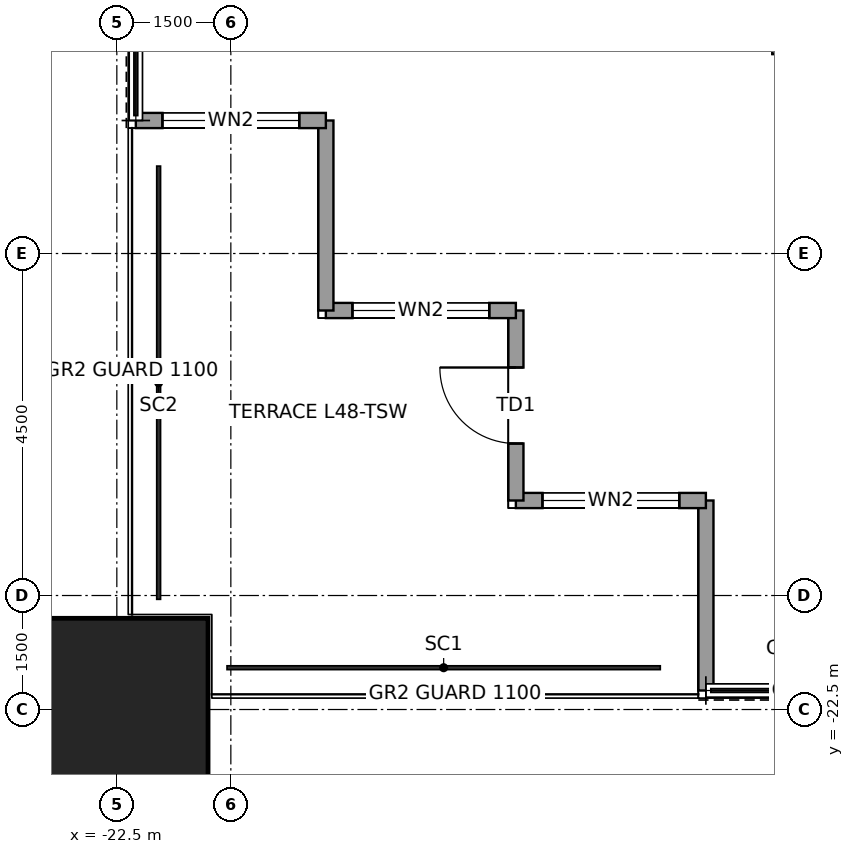
"""IFC4 building model, lengths in metres.
Left out: names, types, materials, properties, quantities, classifications, styles, units other than length and angle.
Written with IfcOpenShell. Run it as: python <this file> out.ifc"""

import sys

from ifc_helpers import new_model, si_unit, direction, frame, frame_2d, origin, origin_2d, place, context, subcontext, project, spatial, rectangle, hollow_rectangle, extrude, element, fill, save


model = new_model("IFC4")
c1 = context("Model", 3, precision=1e-05, world=origin(), true_north=direction((0.0, 1.0)))
c2 = subcontext(c1, "Body", "Model", "MODEL_VIEW")
j1 = project(units=[si_unit("LENGTHUNIT", "METRE"), si_unit("PLANEANGLEUNIT", "RADIAN")], contexts=[c1])
p1 = place(None, origin())
s1 = spatial("IfcSite", under=j1, at=p1, CompositionType="ELEMENT")
p2 = place(p1, origin())
s2 = spatial("IfcBuilding", under=s1, at=p2, CompositionType="ELEMENT")
p3 = place(p2, frame((0.0, 0.0, 225.9)))
s3 = spatial("IfcBuildingStorey", under=s2, at=p3, CompositionType="ELEMENT", Elevation=225.9)
p4 = place(p3, frame((-22.5, -22.5, 0.0), z_axis=(0.0, 0.0, 1.0), x_axis=(1.0, 0.0, 0.0)))
e1 = element("IfcColumn", 1, at=p4, inside=s3, PredefinedType="COLUMN", context=c2, shape_type="SweptSolid", body=[
    extrude(hollow_rectangle(XDim=2.4, YDim=2.4, WallThickness=0.12, at=origin_2d()), origin(), (0.0, 0.0, 1.0), 4.0),
])
p5 = place(p3, frame((-14.75, -22.25, 0.0), z_axis=(0.0, 0.0, 1.0), x_axis=(0.0, 1.0, 0.0)))
e2 = element("IfcWall", 2, at=p5, inside=s3, PredefinedType="SOLIDWALL", context=c2, shape_type="SweptSolid", body=[
    extrude(rectangle(XDim=2.5, YDim=0.2, at=frame_2d((1.25, 0.0))), origin(), (0.0, 0.0, 1.0), 3.85),
])
p6 = place(p3, frame((-14.75, -19.75, 0.0), z_axis=(0.0, 0.0, 1.0), x_axis=(-1.0, 0.0, 0.0)))
e3 = element("IfcWall", 3, at=p6, inside=s3, PredefinedType="SOLIDWALL", context=c2, shape_type="SweptSolid", body=[
    extrude(rectangle(XDim=2.5, YDim=0.2, at=frame_2d((1.25, 0.0))), origin(), (0.0, 0.0, 1.0), 3.85),
])
p7 = place(p6, frame((0.35, 0.0, 0.3)))
e4 = element("IfcOpeningElement", 4, at=p7, cuts=e3, PredefinedType="OPENING", context=c2, shape_type="SweptSolid", body=[
    extrude(rectangle(XDim=1.8, YDim=2.4, at=frame_2d((0.9, 1.2))), frame((0.0, 0.11, 0.0), z_axis=(0.0, -1.0, 0.0), x_axis=(1.0, 0.0, 0.0)), (0.0, 0.0, 1.0), 0.22),
])
p8 = place(p3, frame((-17.25, -19.75, 0.0), z_axis=(0.0, 0.0, 1.0), x_axis=(0.0, 1.0, 0.0)))
e5 = element("IfcWall", 5, at=p8, inside=s3, PredefinedType="SOLIDWALL", context=c2, shape_type="SweptSolid", body=[
    extrude(rectangle(XDim=2.5, YDim=0.2, at=frame_2d((1.25, 0.0))), origin(), (0.0, 0.0, 1.0), 3.85),
])
p9 = place(p8, frame((0.75, 0.0, 0.0)))
e6 = element("IfcOpeningElement", 6, at=p9, cuts=e5, PredefinedType="OPENING", context=c2, shape_type="SweptSolid", body=[
    extrude(rectangle(XDim=1.0, YDim=2.4, at=frame_2d((0.5, 1.2))), frame((0.0, 0.11, 0.0), z_axis=(0.0, -1.0, 0.0), x_axis=(1.0, 0.0, 0.0)), (0.0, 0.0, 1.0), 0.22),
])
p10 = place(p3, frame((-17.25, -17.25, 0.0), z_axis=(0.0, 0.0, 1.0), x_axis=(-1.0, 0.0, 0.0)))
e7 = element("IfcWall", 7, at=p10, inside=s3, PredefinedType="SOLIDWALL", context=c2, shape_type="SweptSolid", body=[
    extrude(rectangle(XDim=2.5, YDim=0.2, at=frame_2d((1.25, 0.0))), origin(), (0.0, 0.0, 1.0), 3.85),
])
p11 = place(p10, frame((0.35, 0.0, 0.3)))
e8 = element("IfcOpeningElement", 8, at=p11, cuts=e7, PredefinedType="OPENING", context=c2, shape_type="SweptSolid", body=[
    extrude(rectangle(XDim=1.8, YDim=2.4, at=frame_2d((0.9, 1.2))), frame((0.0, 0.11, 0.0), z_axis=(0.0, -1.0, 0.0), x_axis=(1.0, 0.0, 0.0)), (0.0, 0.0, 1.0), 0.22),
])
p12 = place(p3, frame((-19.75, -17.25, 0.0), z_axis=(0.0, 0.0, 1.0), x_axis=(0.0, 1.0, 0.0)))
e9 = element("IfcWall", 9, at=p12, inside=s3, PredefinedType="SOLIDWALL", context=c2, shape_type="SweptSolid", body=[
    extrude(rectangle(XDim=2.5, YDim=0.2, at=frame_2d((1.25, 0.0))), origin(), (0.0, 0.0, 1.0), 3.85),
])
p13 = place(p3, frame((-19.75, -14.75, 0.0), z_axis=(0.0, 0.0, 1.0), x_axis=(-1.0, 0.0, 0.0)))
e10 = element("IfcWall", 10, at=p13, inside=s3, PredefinedType="SOLIDWALL", context=c2, shape_type="SweptSolid", body=[
    extrude(rectangle(XDim=2.5, YDim=0.2, at=frame_2d((1.25, 0.0))), origin(), (0.0, 0.0, 1.0), 3.85),
])
p14 = place(p13, frame((0.35, 0.0, 0.3)))
e11 = element("IfcOpeningElement", 11, at=p14, cuts=e10, PredefinedType="OPENING", context=c2, shape_type="SweptSolid", body=[
    extrude(rectangle(XDim=1.8, YDim=2.4, at=frame_2d((0.9, 1.2))), frame((0.0, 0.11, 0.0), z_axis=(0.0, -1.0, 0.0), x_axis=(1.0, 0.0, 0.0)), (0.0, 0.0, 1.0), 0.22),
])
p15 = place(p3, frame((-13.875, -13.8, 0.0), z_axis=(0.0, 0.0, 1.0), x_axis=(1.0, 0.0, 0.0)))
e12 = element("IfcWall", 12, at=p15, inside=s3, PredefinedType="PARTITIONING", context=c2, shape_type="SweptSolid", body=[
    extrude(rectangle(XDim=8.95, YDim=0.15, at=frame_2d((4.475, 0.0))), origin(), (0.0, 0.0, 1.0), 3.85),
])
p16 = place(p15, frame((3.975, 0.0, 0.0)))
e13 = element("IfcOpeningElement", 13, at=p16, cuts=e12, PredefinedType="OPENING", context=c2, shape_type="SweptSolid", body=[
    extrude(rectangle(XDim=1.0, YDim=2.4, at=frame_2d((0.5, 1.2))), frame((0.0, 0.085, 0.0), z_axis=(0.0, -1.0, 0.0), x_axis=(1.0, 0.0, 0.0)), (0.0, 0.0, 1.0), 0.17),
])
p17 = place(p3, frame((-13.8, -13.875, 0.0), z_axis=(0.0, 0.0, 1.0), x_axis=(0.0, 1.0, 0.0)))
e14 = element("IfcWall", 14, at=p17, inside=s3, PredefinedType="PARTITIONING", context=c2, shape_type="SweptSolid", body=[
    extrude(rectangle(XDim=25.95, YDim=0.15, at=frame_2d((12.975, 0.0))), origin(), (0.0, 0.0, 1.0), 3.85),
])
p18 = place(p7, origin())
e15 = element("IfcWindow", 15, at=p18, inside=s3, PartitioningType="SINGLE_PANEL", PredefinedType="WINDOW", context=c2, shape_type="SweptSolid", body=[
    extrude(rectangle(XDim=1.8, YDim=2.4, at=frame_2d((0.9, 1.2))), frame((0.0, 0.03, 0.0), z_axis=(0.0, -1.0, 0.0), x_axis=(1.0, 0.0, 0.0)), (0.0, 0.0, 1.0), 0.06),
])
fill(e4, e15)
p19 = place(p9, origin())
e16 = element("IfcDoor", 16, at=p19, inside=s3, OperationType="SINGLE_SWING_RIGHT", PredefinedType="DOOR", context=c2, shape_type="SweptSolid", body=[
    extrude(rectangle(XDim=1.0, YDim=2.4, at=frame_2d((0.5, 1.2))), frame((0.0, 0.025, 0.0), z_axis=(0.0, -1.0, 0.0), x_axis=(1.0, 0.0, 0.0)), (0.0, 0.0, 1.0), 0.05),
])
fill(e6, e16)
p20 = place(p11, origin())
e17 = element("IfcWindow", 17, at=p20, inside=s3, PartitioningType="SINGLE_PANEL", PredefinedType="WINDOW", context=c2, shape_type="SweptSolid", body=[
    extrude(rectangle(XDim=1.8, YDim=2.4, at=frame_2d((0.9, 1.2))), frame((0.0, 0.03, 0.0), z_axis=(0.0, -1.0, 0.0), x_axis=(1.0, 0.0, 0.0)), (0.0, 0.0, 1.0), 0.06),
])
fill(e8, e17)
p21 = place(p14, origin())
e18 = element("IfcWindow", 18, at=p21, inside=s3, PartitioningType="SINGLE_PANEL", PredefinedType="WINDOW", context=c2, shape_type="SweptSolid", body=[
    extrude(rectangle(XDim=1.8, YDim=2.4, at=frame_2d((0.9, 1.2))), frame((0.0, 0.03, 0.0), z_axis=(0.0, -1.0, 0.0), x_axis=(1.0, 0.0, 0.0)), (0.0, 0.0, 1.0), 0.06),
])
fill(e11, e18)
save(model, sys.argv[1])
